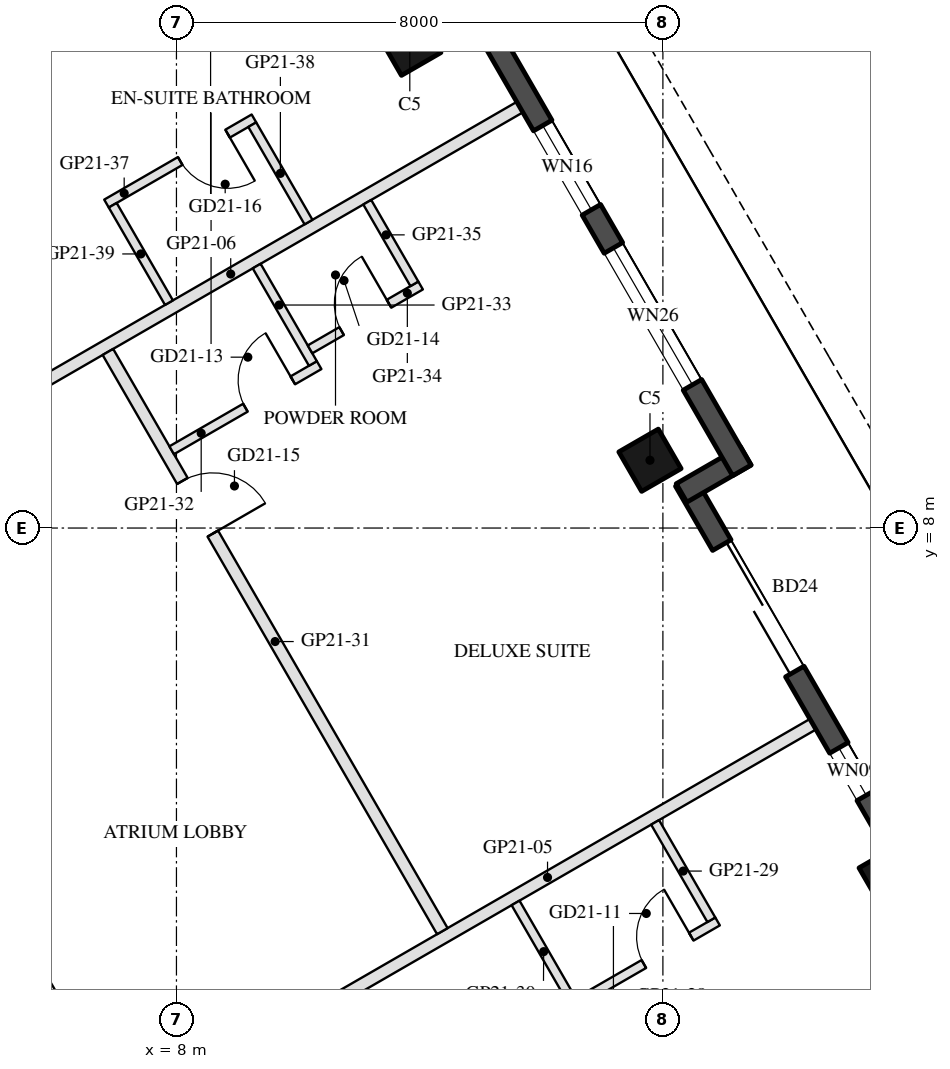
"""IFC4 building model, lengths in metres.
Left out: names, types, materials, properties, quantities, classifications, styles, units other than length and angle.
Written with IfcOpenShell. Run it as: python <this file> out.ifc"""

import sys

from ifc_helpers import new_model, si_unit, direction, frame, frame_2d, origin, origin_2d, place, context, subcontext, project, spatial, rectangle, hollow_rectangle, extrude, element, fill, save


model = new_model("IFC4")
c1 = context("Model", 3, precision=1e-05, world=origin(), true_north=direction((0.0, 1.0)))
c2 = subcontext(c1, "Body", "Model", "MODEL_VIEW")
j1 = project(units=[si_unit("LENGTHUNIT", "METRE"), si_unit("PLANEANGLEUNIT", "RADIAN")], contexts=[c1])
p1 = place(None, origin())
s1 = spatial("IfcSite", under=j1, at=p1, CompositionType="ELEMENT")
p2 = place(p1, origin())
s2 = spatial("IfcBuilding", under=s1, at=p2, CompositionType="ELEMENT")
p3 = place(p2, frame((0.0, 0.0, 216.9)))
s3 = spatial("IfcBuildingStorey", under=s2, at=p3, CompositionType="ELEMENT", Elevation=216.9)
for number, where, z_axis, x_axis in (
    (1, (19.738, 2.273, 0.0), (0.0, 0.0, 1.0), (-0.5, 0.866, 0.0)),
    (2, (15.788, 9.115, 0.0), (0.0, 0.0, 1.0), (-0.5, 0.866, 0.0)),
    (3, (11.838, 15.957, 0.0), (0.0, 0.0, 1.0), (-0.5, 0.866, 0.0)),
):
    element("IfcColumn", number, at=place(p3, frame(where, z_axis=z_axis, x_axis=x_axis)), inside=s3, PredefinedType="COLUMN", context=c2, shape_type="SweptSolid", body=[
        extrude(hollow_rectangle(XDim=0.75, YDim=0.75, WallThickness=0.035, at=origin_2d()), origin(), (0.0, 0.0, 1.0), 3.7),
    ])
p4 = place(p3, frame((19.729, 2.938, 0.0), z_axis=(0.0, 0.0, 1.0), x_axis=(-0.499976430342, 0.866039011305, 0.0)))
e4 = element("IfcWall", 4, at=p4, inside=s3, PredefinedType="SOLIDWALL", context=c2, shape_type="SweptSolid", body=[
    extrude(rectangle(XDim=6.74, YDim=0.35, at=frame_2d((3.37, 0.0))), origin(), (0.0, 0.0, 1.0), 3.55),
])
p5 = place(p4, frame((0.77, 0.0, 0.3)))
e5 = element("IfcOpeningElement", 5, at=p5, cuts=e4, PredefinedType="OPENING", context=c2, shape_type="SweptSolid", body=[
    extrude(rectangle(XDim=0.9, YDim=2.65, at=frame_2d((0.45, 1.325))), frame((0.0, 0.185, 0.0), z_axis=(0.0, -1.0, 0.0), x_axis=(1.0, 0.0, 0.0)), (0.0, 0.0, 1.0), 0.37),
])
p6 = place(p4, frame((3.12, 0.0, 0.0)))
e6 = element("IfcOpeningElement", 6, at=p6, cuts=e4, PredefinedType="OPENING", context=c2, shape_type="SweptSolid", body=[
    extrude(rectangle(XDim=2.4, YDim=2.4, at=frame_2d((1.2, 1.2))), frame((0.0, 0.185, 0.0), z_axis=(0.0, -1.0, 0.0), x_axis=(1.0, 0.0, 0.0)), (0.0, 0.0, 1.0), 0.37),
])
p7 = place(p3, frame((16.306, 8.577, 0.0), z_axis=(0.0, 0.0, 1.0), x_axis=(0.866092288191, 0.499884134912, 0.0)))
e7 = element("IfcWall", 7, at=p7, inside=s3, PredefinedType="SOLIDWALL", context=c2, shape_type="SweptSolid", body=[
    extrude(rectangle(XDim=1.22, YDim=0.35, at=frame_2d((0.61, 0.0))), origin(), (0.0, 0.0, 1.0), 3.55),
])
p8 = place(p3, frame((17.299, 8.948, 0.0), z_axis=(0.0, 0.0, 1.0), x_axis=(-0.500010041276, 0.866019606374, 0.0)))
e8 = element("IfcWall", 8, at=p8, inside=s3, PredefinedType="SOLIDWALL", context=c2, shape_type="SweptSolid", body=[
    extrude(rectangle(XDim=9.7, YDim=0.35, at=frame_2d((4.85, 0.0))), origin(), (0.0, 0.0, 1.0), 3.55),
])
p9 = place(p8, frame((1.625, 0.0, 0.3)))
e9 = element("IfcOpeningElement", 9, at=p9, cuts=e8, PredefinedType="OPENING", context=c2, shape_type="SweptSolid", body=[
    extrude(rectangle(XDim=2.6, YDim=2.65, at=frame_2d((1.3, 1.325))), frame((0.0, 0.185, 0.0), z_axis=(0.0, -1.0, 0.0), x_axis=(1.0, 0.0, 0.0)), (0.0, 0.0, 1.0), 0.37),
])
p10 = place(p8, frame((4.949, 0.0, 0.3)))
e10 = element("IfcOpeningElement", 10, at=p10, cuts=e8, PredefinedType="OPENING", context=c2, shape_type="SweptSolid", body=[
    extrude(rectangle(XDim=1.6, YDim=2.65, at=frame_2d((0.8, 1.325))), frame((0.0, 0.185, 0.0), z_axis=(0.0, -1.0, 0.0), x_axis=(1.0, 0.0, 0.0)), (0.0, 0.0, 1.0), 0.37),
])
p11 = place(p3, frame((18.468, 4.773, 0.0), z_axis=(0.0, 0.0, 1.0), x_axis=(-0.866033125095, -0.499986626058, 0.0)))
e11 = element("IfcWall", 11, at=p11, inside=s3, PredefinedType="PARTITIONING", context=c2, shape_type="SweptSolid", body=[
    extrude(rectangle(XDim=10.08, YDim=0.2, at=frame_2d((5.04, 0.0))), origin(), (0.0, 0.0, 1.0), 3.06),
])
p12 = place(p3, frame((13.647, 14.923, 0.0), z_axis=(0.0, 0.0, 1.0), x_axis=(-0.866027479907, -0.499996404033, 0.0)))
e12 = element("IfcWall", 12, at=p12, inside=s3, PredefinedType="PARTITIONING", context=c2, shape_type="SweptSolid", body=[
    extrude(rectangle(XDim=10.98, YDim=0.2, at=frame_2d((5.49, 0.0))), origin(), (0.0, 0.0, 1.0), 3.06),
])
p13 = place(p3, frame((14.474, 0.13, 0.0), z_axis=(0.0, 0.0, 1.0), x_axis=(0.866056369097, 0.49994636267, 0.0)))
e13 = element("IfcWall", 13, at=p13, inside=s3, PredefinedType="PARTITIONING", context=c2, shape_type="SweptSolid", body=[
    extrude(rectangle(XDim=2.8, YDim=0.15, at=frame_2d((1.4, 0.0))), origin(), (0.0, 0.0, 1.0), 3.55),
])
p14 = place(p13, frame((1.4, 0.0, 0.0)))
e14 = element("IfcOpeningElement", 14, at=p14, cuts=e13, PredefinedType="OPENING", context=c2, shape_type="SweptSolid", body=[
    extrude(rectangle(XDim=0.9, YDim=2.1, at=frame_2d((0.45, 1.05))), frame((0.0, 0.085, 0.0), z_axis=(0.0, -1.0, 0.0), x_axis=(1.0, 0.0, 0.0)), (0.0, 0.0, 1.0), 0.17),
])
for number, where, z_axis, x_axis in (
    (15, (16.797, 1.557, 0.0), (0.0, 0.0, 1.0), (-0.5, 0.866, 0.0)),
    (16, (14.502, 0.232, 0.0), (0.0, 0.0, 1.0), (-0.5, 0.866, 0.0)),
):
    element("IfcWall", number, at=place(p3, frame(where, z_axis=z_axis, x_axis=x_axis)), inside=s3, PredefinedType="PARTITIONING", context=c2, shape_type="SweptSolid", body=[
        extrude(rectangle(XDim=1.85, YDim=0.15, at=frame_2d((0.925, 0.0))), origin(), (0.0, 0.0, 1.0), 3.55),
    ])
p15 = place(p3, frame((6.873, 10.896, 0.0), z_axis=(0.0, 0.0, 1.0), x_axis=(0.499996545922, -0.866027397988, 0.0)))
e17 = element("IfcWall", 17, at=p15, inside=s3, PredefinedType="PARTITIONING", context=c2, shape_type="SweptSolid", body=[
    extrude(rectangle(XDim=11.0, YDim=0.2, at=frame_2d((5.5, 0.0))), origin(), (0.0, 0.0, 1.0), 2.95),
])
p16 = place(p15, frame((2.45, 0.0, 0.0)))
e18 = element("IfcOpeningElement", 18, at=p16, cuts=e17, PredefinedType="OPENING", context=c2, shape_type="SweptSolid", body=[
    extrude(rectangle(XDim=1.0, YDim=2.1, at=frame_2d((0.5, 1.05))), frame((0.0, 0.11, 0.0), z_axis=(0.0, -1.0, 0.0), x_axis=(1.0, 0.0, 0.0)), (0.0, 0.0, 1.0), 0.22),
])
p17 = place(p3, frame((7.922, 9.279, 0.0), z_axis=(0.0, 0.0, 1.0), x_axis=(0.865996816683, 0.500049511043, 0.0)))
e19 = element("IfcWall", 19, at=p17, inside=s3, PredefinedType="PARTITIONING", context=c2, shape_type="SweptSolid", body=[
    extrude(rectangle(XDim=2.8, YDim=0.15, at=frame_2d((1.4, 0.0))), origin(), (0.0, 0.0, 1.0), 2.95),
])
p18 = place(p17, frame((1.4, 0.0, 0.0)))
e20 = element("IfcOpeningElement", 20, at=p18, cuts=e19, PredefinedType="OPENING", context=c2, shape_type="SweptSolid", body=[
    extrude(rectangle(XDim=0.9, YDim=2.1, at=frame_2d((0.45, 1.05))), frame((0.0, 0.085, 0.0), z_axis=(0.0, -1.0, 0.0), x_axis=(1.0, 0.0, 0.0)), (0.0, 0.0, 1.0), 0.17),
])
p19 = place(p3, frame((10.244, 10.707, 0.0), z_axis=(0.0, 0.0, 1.0), x_axis=(-0.500042316284, 0.866000971088, 0.0)))
e21 = element("IfcWall", 21, at=p19, inside=s3, PredefinedType="PARTITIONING", context=c2, shape_type="SweptSolid", body=[
    extrude(rectangle(XDim=1.85, YDim=0.15, at=frame_2d((0.925, 0.0))), origin(), (0.0, 0.0, 1.0), 3.55),
])
p20 = place(p3, frame((10.197, 10.939, 0.0), z_axis=(0.0, 0.0, 1.0), x_axis=(0.866009402589, 0.500027713859, 0.0)))
e22 = element("IfcWall", 22, at=p20, inside=s3, PredefinedType="PARTITIONING", context=c2, shape_type="SweptSolid", body=[
    extrude(rectangle(XDim=2.1, YDim=0.15, at=frame_2d((1.05, 0.0))), origin(), (0.0, 0.0, 1.0), 3.55),
])
p21 = place(p20, frame((0.6, 0.0, 0.0)))
e23 = element("IfcOpeningElement", 23, at=p21, cuts=e22, PredefinedType="OPENING", context=c2, shape_type="SweptSolid", body=[
    extrude(rectangle(XDim=0.9, YDim=2.1, at=frame_2d((0.45, 1.05))), frame((0.0, 0.085, 0.0), z_axis=(0.0, -1.0, 0.0), x_axis=(1.0, 0.0, 0.0)), (0.0, 0.0, 1.0), 0.17),
])
p22 = place(p3, frame((11.913, 12.016, 0.0), z_axis=(0.0, 0.0, 1.0), x_axis=(-0.499967891604, 0.866043940782, 0.0)))
e24 = element("IfcWall", 24, at=p22, inside=s3, PredefinedType="PARTITIONING", context=c2, shape_type="SweptSolid", body=[
    extrude(rectangle(XDim=1.55, YDim=0.15, at=frame_2d((0.775, 0.0))), origin(), (0.0, 0.0, 1.0), 3.55),
])
p23 = place(p3, frame((9.274, 14.737, 0.0), z_axis=(0.0, 0.0, 1.0), x_axis=(-0.866018616679, -0.500011755427, 0.0)))
e25 = element("IfcWall", 25, at=p23, inside=s3, PredefinedType="PARTITIONING", context=c2, shape_type="SweptSolid", body=[
    extrude(rectangle(XDim=2.8, YDim=0.15, at=frame_2d((1.4, 0.0))), origin(), (0.0, 0.0, 1.0), 3.55),
])
p24 = place(p23, frame((0.5, 0.0, 0.0)))
e26 = element("IfcOpeningElement", 26, at=p24, cuts=e25, PredefinedType="OPENING", context=c2, shape_type="SweptSolid", body=[
    extrude(rectangle(XDim=0.9, YDim=2.1, at=frame_2d((0.45, 1.05))), frame((0.0, 0.085, 0.0), z_axis=(0.0, -1.0, 0.0), x_axis=(1.0, 0.0, 0.0)), (0.0, 0.0, 1.0), 0.17),
])
p25 = place(p3, frame((10.172, 13.032, 0.0), z_axis=(0.0, 0.0, 1.0), x_axis=(-0.500042316284, 0.866000971088, 0.0)))
e27 = element("IfcWall", 27, at=p25, inside=s3, PredefinedType="PARTITIONING", context=c2, shape_type="SweptSolid", body=[
    extrude(rectangle(XDim=1.85, YDim=0.15, at=frame_2d((0.925, 0.0))), origin(), (0.0, 0.0, 1.0), 2.95),
])
p26 = place(p3, frame((7.877, 11.707, 0.0), z_axis=(0.0, 0.0, 1.0), x_axis=(-0.499985172903, 0.866033964044, 0.0)))
e28 = element("IfcWall", 28, at=p26, inside=s3, PredefinedType="PARTITIONING", context=c2, shape_type="SweptSolid", body=[
    extrude(rectangle(XDim=1.85, YDim=0.15, at=frame_2d((0.925, 0.0))), origin(), (0.0, 0.0, 1.0), 2.95),
])
p27 = place(p5, origin())
e29 = element("IfcWindow", 29, at=p27, inside=s3, PartitioningType="SINGLE_PANEL", PredefinedType="WINDOW", context=c2, shape_type="SweptSolid", body=[
    extrude(rectangle(XDim=0.9, YDim=2.65, at=frame_2d((0.45, 1.325))), frame((0.0, 0.03, 0.0), z_axis=(0.0, -1.0, 0.0), x_axis=(1.0, 0.0, 0.0)), (0.0, 0.0, 1.0), 0.06),
])
fill(e5, e29)
p28 = place(p6, frame((2.4, 0.0, 0.0), z_axis=(0.0, 0.0, 1.0), x_axis=(-1.0, 0.0, 0.0)))
e30 = element("IfcDoor", 30, at=p28, inside=s3, OperationType="SLIDING_TO_LEFT", PredefinedType="DOOR", context=c2, shape_type="SweptSolid", body=[
    extrude(rectangle(XDim=2.4, YDim=2.4, at=frame_2d((1.2, 1.2))), frame((0.0, 0.025, 0.0), z_axis=(0.0, -1.0, 0.0), x_axis=(1.0, 0.0, 0.0)), (0.0, 0.0, 1.0), 0.05),
])
fill(e6, e30)
p29 = place(p9, origin())
e31 = element("IfcWindow", 31, at=p29, inside=s3, PartitioningType="SINGLE_PANEL", PredefinedType="WINDOW", context=c2, shape_type="SweptSolid", body=[
    extrude(rectangle(XDim=2.6, YDim=2.65, at=frame_2d((1.3, 1.325))), frame((0.0, 0.03, 0.0), z_axis=(0.0, -1.0, 0.0), x_axis=(1.0, 0.0, 0.0)), (0.0, 0.0, 1.0), 0.06),
])
fill(e9, e31)
p30 = place(p10, origin())
e32 = element("IfcWindow", 32, at=p30, inside=s3, PartitioningType="SINGLE_PANEL", PredefinedType="WINDOW", context=c2, shape_type="SweptSolid", body=[
    extrude(rectangle(XDim=1.6, YDim=2.65, at=frame_2d((0.8, 1.325))), frame((0.0, 0.03, 0.0), z_axis=(0.0, -1.0, 0.0), x_axis=(1.0, 0.0, 0.0)), (0.0, 0.0, 1.0), 0.06),
])
fill(e10, e32)
p31 = place(p14, origin())
e33 = element("IfcDoor", 33, at=p31, inside=s3, OperationType="SINGLE_SWING_RIGHT", PredefinedType="DOOR", context=c2, shape_type="SweptSolid", body=[
    extrude(rectangle(XDim=0.9, YDim=2.1, at=frame_2d((0.45, 1.05))), frame((0.0, 0.025, 0.0), z_axis=(0.0, -1.0, 0.0), x_axis=(1.0, 0.0, 0.0)), (0.0, 0.0, 1.0), 0.05),
])
fill(e14, e33)
p32 = place(p18, origin())
e34 = element("IfcDoor", 34, at=p32, inside=s3, OperationType="SINGLE_SWING_RIGHT", PredefinedType="DOOR", context=c2, shape_type="SweptSolid", body=[
    extrude(rectangle(XDim=0.9, YDim=2.1, at=frame_2d((0.45, 1.05))), frame((0.0, 0.025, 0.0), z_axis=(0.0, -1.0, 0.0), x_axis=(1.0, 0.0, 0.0)), (0.0, 0.0, 1.0), 0.05),
])
fill(e20, e34)
p33 = place(p21, origin())
e35 = element("IfcDoor", 35, at=p33, inside=s3, OperationType="SINGLE_SWING_RIGHT", PredefinedType="DOOR", context=c2, shape_type="SweptSolid", body=[
    extrude(rectangle(XDim=0.9, YDim=2.1, at=frame_2d((0.45, 1.05))), frame((0.0, 0.025, 0.0), z_axis=(0.0, -1.0, 0.0), x_axis=(1.0, 0.0, 0.0)), (0.0, 0.0, 1.0), 0.05),
])
fill(e23, e35)
p34 = place(p16, origin())
e36 = element("IfcDoor", 36, at=p34, inside=s3, OperationType="SINGLE_SWING_RIGHT", PredefinedType="DOOR", context=c2, shape_type="SweptSolid", body=[
    extrude(rectangle(XDim=1.0, YDim=2.1, at=frame_2d((0.5, 1.05))), frame((0.0, 0.025, 0.0), z_axis=(0.0, -1.0, 0.0), x_axis=(1.0, 0.0, 0.0)), (0.0, 0.0, 1.0), 0.05),
])
fill(e18, e36)
p35 = place(p24, origin())
e37 = element("IfcDoor", 37, at=p35, inside=s3, OperationType="SINGLE_SWING_LEFT", PredefinedType="DOOR", context=c2, shape_type="SweptSolid", body=[
    extrude(rectangle(XDim=0.9, YDim=2.1, at=frame_2d((0.45, 1.05))), frame((0.0, 0.025, 0.0), z_axis=(0.0, -1.0, 0.0), x_axis=(1.0, 0.0, 0.0)), (0.0, 0.0, 1.0), 0.05),
])
fill(e26, e37)
save(model, sys.argv[1])
